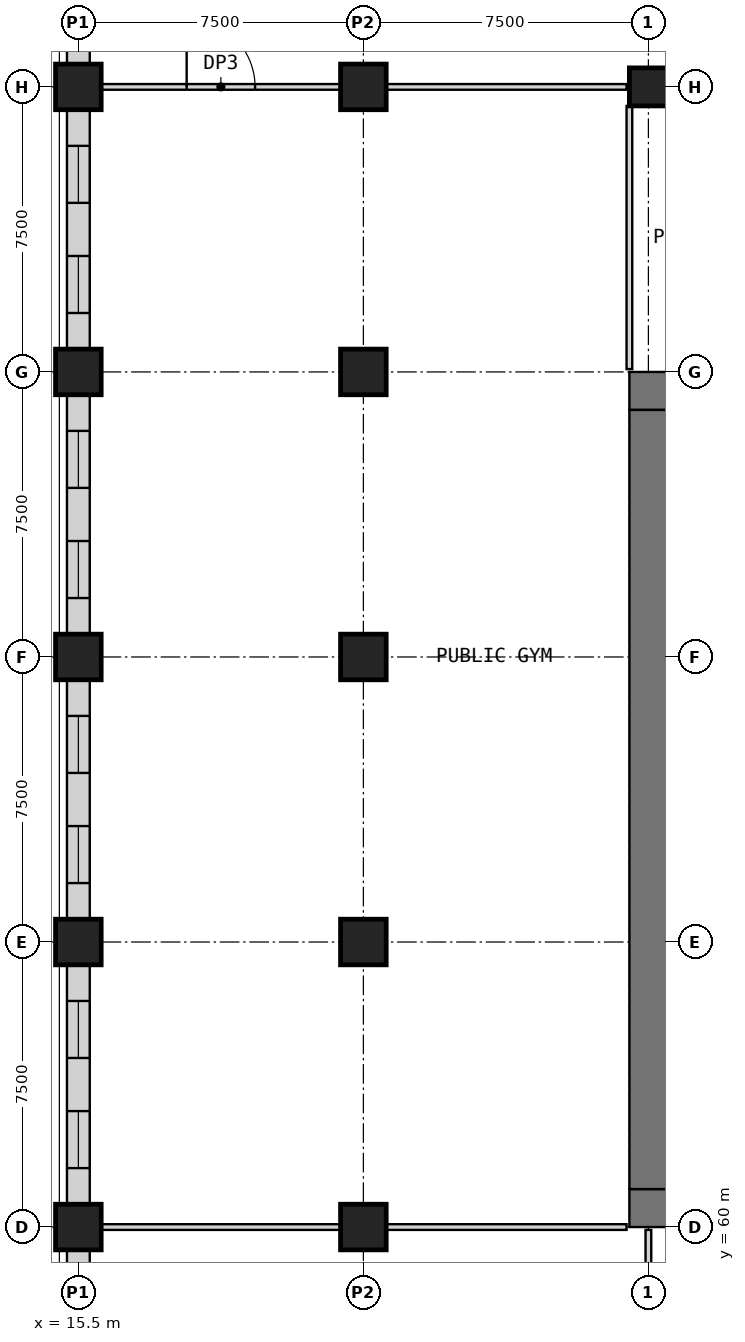
"""IFC4 building model, lengths in metres.
Left out: names, types, materials, properties, quantities, classifications, styles, units other than length and angle.
Written with IfcOpenShell. Run it as: python <this file> out.ifc"""

import sys

from ifc_helpers import new_model, si_unit, direction, frame, frame_2d, origin, origin_2d, place, context, subcontext, project, spatial, rectangle, extrude, element, fill, save


model = new_model("IFC4")
c1 = context("Model", 3, precision=1e-05, world=origin(), true_north=direction((0.0, 1.0)))
c2 = subcontext(c1, "Body", "Model", "MODEL_VIEW")
j1 = project(units=[si_unit("LENGTHUNIT", "METRE"), si_unit("PLANEANGLEUNIT", "RADIAN")], contexts=[c1])
p1 = place(None, origin())
s1 = spatial("IfcSite", under=j1, at=p1, CompositionType="ELEMENT")
p2 = place(p1, origin())
s2 = spatial("IfcBuilding", under=s1, at=p2, CompositionType="ELEMENT")
p3 = place(p2, frame((0.0, 0.0, 8.0)))
s3 = spatial("IfcBuildingStorey", under=s2, at=p3, CompositionType="ELEMENT", Elevation=8.0)
p4 = place(p3, frame((30.5, 90.0, 0.0), z_axis=(0.0, 0.0, 1.0), x_axis=(1.0, 0.0, 0.0)))
e1 = element("IfcColumn", 1, at=p4, inside=s3, PredefinedType="COLUMN", context=c2, shape_type="SweptSolid", body=[
    extrude(rectangle(XDim=1.0, YDim=1.0, at=origin_2d()), origin(), (0.0, 0.0, 1.0), 5.5),
])
for number, where, z_axis, x_axis in (
    (2, (15.5, 60.0, 0.0), (0.0, 0.0, 1.0), (1.0, 0.0, 0.0)),
    (3, (15.5, 67.5, 0.0), (0.0, 0.0, 1.0), (1.0, 0.0, 0.0)),
    (4, (15.5, 75.0, 0.0), (0.0, 0.0, 1.0), (1.0, 0.0, 0.0)),
    (5, (15.5, 82.5, 0.0), (0.0, 0.0, 1.0), (1.0, 0.0, 0.0)),
    (6, (15.5, 90.0, 0.0), (0.0, 0.0, 1.0), (1.0, 0.0, 0.0)),
    (7, (23.0, 60.0, 0.0), (0.0, 0.0, 1.0), (1.0, 0.0, 0.0)),
    (8, (23.0, 67.5, 0.0), (0.0, 0.0, 1.0), (1.0, 0.0, 0.0)),
    (9, (23.0, 75.0, 0.0), (0.0, 0.0, 1.0), (1.0, 0.0, 0.0)),
    (10, (23.0, 82.5, 0.0), (0.0, 0.0, 1.0), (1.0, 0.0, 0.0)),
    (11, (23.0, 90.0, 0.0), (0.0, 0.0, 1.0), (1.0, 0.0, 0.0)),
):
    element("IfcColumn", number, at=place(p3, frame(where, z_axis=z_axis, x_axis=x_axis)), inside=s3, PredefinedType="COLUMN", context=c2, shape_type="SweptSolid", body=[
        extrude(rectangle(XDim=1.2, YDim=1.2, at=origin_2d()), origin(), (0.0, 0.0, 1.0), 5.5),
    ])
p5 = place(p3, frame((30.0, 60.5, 0.0), z_axis=(0.0, 0.0, 1.0), x_axis=(1.0, 0.0, 0.0)))
e12 = element("IfcWall", 12, at=p5, inside=s3, PredefinedType="SHEAR", context=c2, shape_type="SweptSolid", body=[
    extrude(rectangle(XDim=30.0, YDim=1.0, at=frame_2d((15.0, 0.0))), origin(), (0.0, 0.0, 1.0), 5.5),
])
p6 = place(p5, frame((21.9, 0.0, 0.0)))
e13 = element("IfcOpeningElement", 13, at=p6, cuts=e12, PredefinedType="OPENING", context=c2, shape_type="SweptSolid", body=[
    extrude(rectangle(XDim=1.8, YDim=2.1, at=frame_2d((0.9, 1.05))), frame((0.0, 0.51, 0.0), z_axis=(0.0, -1.0, 0.0), x_axis=(1.0, 0.0, 0.0)), (0.0, 0.0, 1.0), 1.02),
])
p7 = place(p5, frame((26.5, 0.0, 0.0)))
e14 = element("IfcOpeningElement", 14, at=p7, cuts=e12, PredefinedType="OPENING", context=c2, shape_type="SweptSolid", body=[
    extrude(rectangle(XDim=1.2, YDim=2.1, at=frame_2d((0.6, 1.05))), frame((0.0, 0.51, 0.0), z_axis=(0.0, -1.0, 0.0), x_axis=(1.0, 0.0, 0.0)), (0.0, 0.0, 1.0), 1.02),
])
p8 = place(p3, frame((30.0, 82.0, 0.0), z_axis=(0.0, 0.0, 1.0), x_axis=(1.0, 0.0, 0.0)))
e15 = element("IfcWall", 15, at=p8, inside=s3, PredefinedType="SHEAR", context=c2, shape_type="SweptSolid", body=[
    extrude(rectangle(XDim=30.0, YDim=1.0, at=frame_2d((15.0, 0.0))), origin(), (0.0, 0.0, 1.0), 5.5),
])
p9 = place(p3, frame((30.5, 61.0, 0.0), z_axis=(0.0, 0.0, 1.0), x_axis=(0.0, 1.0, 0.0)))
e16 = element("IfcWall", 16, at=p9, inside=s3, PredefinedType="SHEAR", context=c2, shape_type="SweptSolid", body=[
    extrude(rectangle(XDim=20.5, YDim=1.0, at=frame_2d((10.25, 0.0))), origin(), (0.0, 0.0, 1.0), 5.5),
])
p10 = place(p3, frame((16.1, 60.0, 0.0), z_axis=(0.0, 0.0, 1.0), x_axis=(1.0, 0.0, 0.0)))
e17 = element("IfcWall", 17, at=p10, inside=s3, PredefinedType="PARTITIONING", context=c2, shape_type="SweptSolid", body=[
    extrude(rectangle(XDim=6.3, YDim=0.15, at=frame_2d((3.15, 0.0))), origin(), (0.0, 0.0, 1.0), 5.2),
])
p11 = place(p3, frame((23.6, 60.0, 0.0), z_axis=(0.0, 0.0, 1.0), x_axis=(1.0, 0.0, 0.0)))
e18 = element("IfcWall", 18, at=p11, inside=s3, PredefinedType="PARTITIONING", context=c2, shape_type="SweptSolid", body=[
    extrude(rectangle(XDim=6.325, YDim=0.15, at=frame_2d((3.163, 0.0))), origin(), (0.0, 0.0, 1.0), 5.2),
])
p12 = place(p3, frame((16.1, 90.0, 0.0), z_axis=(0.0, 0.0, 1.0), x_axis=(1.0, 0.0, 0.0)))
e19 = element("IfcWall", 19, at=p12, inside=s3, PredefinedType="PARTITIONING", context=c2, shape_type="SweptSolid", body=[
    extrude(rectangle(XDim=6.3, YDim=0.15, at=frame_2d((3.15, 0.0))), origin(), (0.0, 0.0, 1.0), 5.2),
])
p13 = place(p12, frame((2.25, 0.0, 0.0)))
e20 = element("IfcOpeningElement", 20, at=p13, cuts=e19, PredefinedType="OPENING", context=c2, shape_type="SweptSolid", body=[
    extrude(rectangle(XDim=1.8, YDim=2.4, at=frame_2d((0.9, 1.2))), frame((0.0, 0.085, 0.0), z_axis=(0.0, -1.0, 0.0), x_axis=(1.0, 0.0, 0.0)), (0.0, 0.0, 1.0), 0.17),
])
p14 = place(p3, frame((23.6, 90.0, 0.0), z_axis=(0.0, 0.0, 1.0), x_axis=(1.0, 0.0, 0.0)))
e21 = element("IfcWall", 21, at=p14, inside=s3, PredefinedType="PARTITIONING", context=c2, shape_type="SweptSolid", body=[
    extrude(rectangle(XDim=6.325, YDim=0.15, at=frame_2d((3.163, 0.0))), origin(), (0.0, 0.0, 1.0), 5.2),
])
p15 = place(p3, frame((15.5, 53.1, 0.0), z_axis=(0.0, 0.0, 1.0), x_axis=(0.0, 1.0, 0.0)))
e22 = element("IfcWall", 22, at=p15, inside=s3, PredefinedType="PARTITIONING", context=c2, shape_type="SweptSolid", body=[
    extrude(rectangle(XDim=6.3, YDim=0.6, at=frame_2d((3.15, 0.0))), origin(), (0.0, 0.0, 1.0), 4.6),
])
p16 = place(p15, frame((0.951, 0.0, 0.9)))
e23 = element("IfcOpeningElement", 23, at=p16, cuts=e22, PredefinedType="OPENING", context=c2, shape_type="SweptSolid", body=[
    extrude(rectangle(XDim=1.5, YDim=2.8, at=frame_2d((0.75, 1.4))), frame((0.0, 0.31, 0.0), z_axis=(0.0, -1.0, 0.0), x_axis=(1.0, 0.0, 0.0)), (0.0, 0.0, 1.0), 0.62),
])
p17 = place(p15, frame((3.849, 0.0, 0.9)))
e24 = element("IfcOpeningElement", 24, at=p17, cuts=e22, PredefinedType="OPENING", context=c2, shape_type="SweptSolid", body=[
    extrude(rectangle(XDim=1.5, YDim=2.8, at=frame_2d((0.75, 1.4))), frame((0.0, 0.31, 0.0), z_axis=(0.0, -1.0, 0.0), x_axis=(1.0, 0.0, 0.0)), (0.0, 0.0, 1.0), 0.62),
])
p18 = place(p3, frame((15.5, 60.6, 0.0), z_axis=(0.0, 0.0, 1.0), x_axis=(0.0, 1.0, 0.0)))
e25 = element("IfcWall", 25, at=p18, inside=s3, PredefinedType="PARTITIONING", context=c2, shape_type="SweptSolid", body=[
    extrude(rectangle(XDim=6.3, YDim=0.6, at=frame_2d((3.15, 0.0))), origin(), (0.0, 0.0, 1.0), 4.6),
])
p19 = place(p18, frame((0.951, 0.0, 0.9)))
e26 = element("IfcOpeningElement", 26, at=p19, cuts=e25, PredefinedType="OPENING", context=c2, shape_type="SweptSolid", body=[
    extrude(rectangle(XDim=1.5, YDim=2.8, at=frame_2d((0.75, 1.4))), frame((0.0, 0.31, 0.0), z_axis=(0.0, -1.0, 0.0), x_axis=(1.0, 0.0, 0.0)), (0.0, 0.0, 1.0), 0.62),
])
p20 = place(p18, frame((3.849, 0.0, 0.9)))
e27 = element("IfcOpeningElement", 27, at=p20, cuts=e25, PredefinedType="OPENING", context=c2, shape_type="SweptSolid", body=[
    extrude(rectangle(XDim=1.5, YDim=2.8, at=frame_2d((0.75, 1.4))), frame((0.0, 0.31, 0.0), z_axis=(0.0, -1.0, 0.0), x_axis=(1.0, 0.0, 0.0)), (0.0, 0.0, 1.0), 0.62),
])
p21 = place(p3, frame((15.5, 68.1, 0.0), z_axis=(0.0, 0.0, 1.0), x_axis=(0.0, 1.0, 0.0)))
e28 = element("IfcWall", 28, at=p21, inside=s3, PredefinedType="PARTITIONING", context=c2, shape_type="SweptSolid", body=[
    extrude(rectangle(XDim=6.3, YDim=0.6, at=frame_2d((3.15, 0.0))), origin(), (0.0, 0.0, 1.0), 4.6),
])
p22 = place(p21, frame((0.951, 0.0, 0.9)))
e29 = element("IfcOpeningElement", 29, at=p22, cuts=e28, PredefinedType="OPENING", context=c2, shape_type="SweptSolid", body=[
    extrude(rectangle(XDim=1.5, YDim=2.8, at=frame_2d((0.75, 1.4))), frame((0.0, 0.31, 0.0), z_axis=(0.0, -1.0, 0.0), x_axis=(1.0, 0.0, 0.0)), (0.0, 0.0, 1.0), 0.62),
])
p23 = place(p21, frame((3.849, 0.0, 0.9)))
e30 = element("IfcOpeningElement", 30, at=p23, cuts=e28, PredefinedType="OPENING", context=c2, shape_type="SweptSolid", body=[
    extrude(rectangle(XDim=1.5, YDim=2.8, at=frame_2d((0.75, 1.4))), frame((0.0, 0.31, 0.0), z_axis=(0.0, -1.0, 0.0), x_axis=(1.0, 0.0, 0.0)), (0.0, 0.0, 1.0), 0.62),
])
p24 = place(p3, frame((15.5, 75.6, 0.0), z_axis=(0.0, 0.0, 1.0), x_axis=(0.0, 1.0, 0.0)))
e31 = element("IfcWall", 31, at=p24, inside=s3, PredefinedType="PARTITIONING", context=c2, shape_type="SweptSolid", body=[
    extrude(rectangle(XDim=6.3, YDim=0.6, at=frame_2d((3.15, 0.0))), origin(), (0.0, 0.0, 1.0), 4.6),
])
p25 = place(p24, frame((0.951, 0.0, 0.9)))
e32 = element("IfcOpeningElement", 32, at=p25, cuts=e31, PredefinedType="OPENING", context=c2, shape_type="SweptSolid", body=[
    extrude(rectangle(XDim=1.5, YDim=2.8, at=frame_2d((0.75, 1.4))), frame((0.0, 0.31, 0.0), z_axis=(0.0, -1.0, 0.0), x_axis=(1.0, 0.0, 0.0)), (0.0, 0.0, 1.0), 0.62),
])
p26 = place(p24, frame((3.849, 0.0, 0.9)))
e33 = element("IfcOpeningElement", 33, at=p26, cuts=e31, PredefinedType="OPENING", context=c2, shape_type="SweptSolid", body=[
    extrude(rectangle(XDim=1.5, YDim=2.8, at=frame_2d((0.75, 1.4))), frame((0.0, 0.31, 0.0), z_axis=(0.0, -1.0, 0.0), x_axis=(1.0, 0.0, 0.0)), (0.0, 0.0, 1.0), 0.62),
])
p27 = place(p3, frame((15.5, 83.1, 0.0), z_axis=(0.0, 0.0, 1.0), x_axis=(0.0, 1.0, 0.0)))
e34 = element("IfcWall", 34, at=p27, inside=s3, PredefinedType="PARTITIONING", context=c2, shape_type="SweptSolid", body=[
    extrude(rectangle(XDim=6.3, YDim=0.6, at=frame_2d((3.15, 0.0))), origin(), (0.0, 0.0, 1.0), 4.6),
])
p28 = place(p27, frame((0.951, 0.0, 0.9)))
e35 = element("IfcOpeningElement", 35, at=p28, cuts=e34, PredefinedType="OPENING", context=c2, shape_type="SweptSolid", body=[
    extrude(rectangle(XDim=1.5, YDim=2.8, at=frame_2d((0.75, 1.4))), frame((0.0, 0.31, 0.0), z_axis=(0.0, -1.0, 0.0), x_axis=(1.0, 0.0, 0.0)), (0.0, 0.0, 1.0), 0.62),
])
p29 = place(p27, frame((3.849, 0.0, 0.9)))
e36 = element("IfcOpeningElement", 36, at=p29, cuts=e34, PredefinedType="OPENING", context=c2, shape_type="SweptSolid", body=[
    extrude(rectangle(XDim=1.5, YDim=2.8, at=frame_2d((0.75, 1.4))), frame((0.0, 0.31, 0.0), z_axis=(0.0, -1.0, 0.0), x_axis=(1.0, 0.0, 0.0)), (0.0, 0.0, 1.0), 0.62),
])
p30 = place(p3, frame((15.5, 90.6, 0.0), z_axis=(0.0, 0.0, 1.0), x_axis=(0.0, 1.0, 0.0)))
e37 = element("IfcWall", 37, at=p30, inside=s3, PredefinedType="PARTITIONING", context=c2, shape_type="SweptSolid", body=[
    extrude(rectangle(XDim=5.8, YDim=0.6, at=frame_2d((2.9, 0.0))), origin(), (0.0, 0.0, 1.0), 4.6),
])
p31 = place(p30, frame((0.816, 0.0, 0.9)))
e38 = element("IfcOpeningElement", 38, at=p31, cuts=e37, PredefinedType="OPENING", context=c2, shape_type="SweptSolid", body=[
    extrude(rectangle(XDim=1.5, YDim=2.8, at=frame_2d((0.75, 1.4))), frame((0.0, 0.31, 0.0), z_axis=(0.0, -1.0, 0.0), x_axis=(1.0, 0.0, 0.0)), (0.0, 0.0, 1.0), 0.62),
])
p32 = place(p30, frame((3.484, 0.0, 0.9)))
e39 = element("IfcOpeningElement", 39, at=p32, cuts=e37, PredefinedType="OPENING", context=c2, shape_type="SweptSolid", body=[
    extrude(rectangle(XDim=1.5, YDim=2.8, at=frame_2d((0.75, 1.4))), frame((0.0, 0.31, 0.0), z_axis=(0.0, -1.0, 0.0), x_axis=(1.0, 0.0, 0.0)), (0.0, 0.0, 1.0), 0.62),
])
for number, where, z_axis, x_axis in (
    (40, (30.5, 53.0, 0.0), (0.0, 0.0, 1.0), (0.0, 1.0, 0.0)),
    (41, (30.0, 82.575, 0.0), (0.0, 0.0, 1.0), (0.0, 1.0, 0.0)),
):
    element("IfcWall", number, at=place(p3, frame(where, z_axis=z_axis, x_axis=x_axis)), inside=s3, PredefinedType="PARTITIONING", context=c2, shape_type="SweptSolid", body=[
        extrude(rectangle(XDim=6.925, YDim=0.15, at=frame_2d((3.462, 0.0))), origin(), (0.0, 0.0, 1.0), 5.2),
    ])
p33 = place(p13, origin())
e42 = element("IfcDoor", 42, at=p33, inside=s3, OperationType="SINGLE_SWING_LEFT", PredefinedType="DOOR", context=c2, shape_type="SweptSolid", body=[
    extrude(rectangle(XDim=1.8, YDim=2.4, at=frame_2d((0.9, 1.2))), frame((0.0, 0.025, 0.0), z_axis=(0.0, -1.0, 0.0), x_axis=(1.0, 0.0, 0.0)), (0.0, 0.0, 1.0), 0.05),
])
fill(e20, e42)
p34 = place(p19, origin())
e43 = element("IfcWindow", 43, at=p34, inside=s3, PartitioningType="SINGLE_PANEL", PredefinedType="WINDOW", context=c2, shape_type="SweptSolid", body=[
    extrude(rectangle(XDim=1.5, YDim=2.8, at=frame_2d((0.75, 1.4))), frame((0.0, 0.03, 0.0), z_axis=(0.0, -1.0, 0.0), x_axis=(1.0, 0.0, 0.0)), (0.0, 0.0, 1.0), 0.06),
])
fill(e26, e43)
p35 = place(p20, origin())
e44 = element("IfcWindow", 44, at=p35, inside=s3, PartitioningType="SINGLE_PANEL", PredefinedType="WINDOW", context=c2, shape_type="SweptSolid", body=[
    extrude(rectangle(XDim=1.5, YDim=2.8, at=frame_2d((0.75, 1.4))), frame((0.0, 0.03, 0.0), z_axis=(0.0, -1.0, 0.0), x_axis=(1.0, 0.0, 0.0)), (0.0, 0.0, 1.0), 0.06),
])
fill(e27, e44)
p36 = place(p22, origin())
e45 = element("IfcWindow", 45, at=p36, inside=s3, PartitioningType="SINGLE_PANEL", PredefinedType="WINDOW", context=c2, shape_type="SweptSolid", body=[
    extrude(rectangle(XDim=1.5, YDim=2.8, at=frame_2d((0.75, 1.4))), frame((0.0, 0.03, 0.0), z_axis=(0.0, -1.0, 0.0), x_axis=(1.0, 0.0, 0.0)), (0.0, 0.0, 1.0), 0.06),
])
fill(e29, e45)
p37 = place(p23, origin())
e46 = element("IfcWindow", 46, at=p37, inside=s3, PartitioningType="SINGLE_PANEL", PredefinedType="WINDOW", context=c2, shape_type="SweptSolid", body=[
    extrude(rectangle(XDim=1.5, YDim=2.8, at=frame_2d((0.75, 1.4))), frame((0.0, 0.03, 0.0), z_axis=(0.0, -1.0, 0.0), x_axis=(1.0, 0.0, 0.0)), (0.0, 0.0, 1.0), 0.06),
])
fill(e30, e46)
p38 = place(p25, origin())
e47 = element("IfcWindow", 47, at=p38, inside=s3, PartitioningType="SINGLE_PANEL", PredefinedType="WINDOW", context=c2, shape_type="SweptSolid", body=[
    extrude(rectangle(XDim=1.5, YDim=2.8, at=frame_2d((0.75, 1.4))), frame((0.0, 0.03, 0.0), z_axis=(0.0, -1.0, 0.0), x_axis=(1.0, 0.0, 0.0)), (0.0, 0.0, 1.0), 0.06),
])
fill(e32, e47)
p39 = place(p26, origin())
e48 = element("IfcWindow", 48, at=p39, inside=s3, PartitioningType="SINGLE_PANEL", PredefinedType="WINDOW", context=c2, shape_type="SweptSolid", body=[
    extrude(rectangle(XDim=1.5, YDim=2.8, at=frame_2d((0.75, 1.4))), frame((0.0, 0.03, 0.0), z_axis=(0.0, -1.0, 0.0), x_axis=(1.0, 0.0, 0.0)), (0.0, 0.0, 1.0), 0.06),
])
fill(e33, e48)
p40 = place(p28, origin())
e49 = element("IfcWindow", 49, at=p40, inside=s3, PartitioningType="SINGLE_PANEL", PredefinedType="WINDOW", context=c2, shape_type="SweptSolid", body=[
    extrude(rectangle(XDim=1.5, YDim=2.8, at=frame_2d((0.75, 1.4))), frame((0.0, 0.03, 0.0), z_axis=(0.0, -1.0, 0.0), x_axis=(1.0, 0.0, 0.0)), (0.0, 0.0, 1.0), 0.06),
])
fill(e35, e49)
p41 = place(p29, origin())
e50 = element("IfcWindow", 50, at=p41, inside=s3, PartitioningType="SINGLE_PANEL", PredefinedType="WINDOW", context=c2, shape_type="SweptSolid", body=[
    extrude(rectangle(XDim=1.5, YDim=2.8, at=frame_2d((0.75, 1.4))), frame((0.0, 0.03, 0.0), z_axis=(0.0, -1.0, 0.0), x_axis=(1.0, 0.0, 0.0)), (0.0, 0.0, 1.0), 0.06),
])
fill(e36, e50)
save(model, sys.argv[1])
